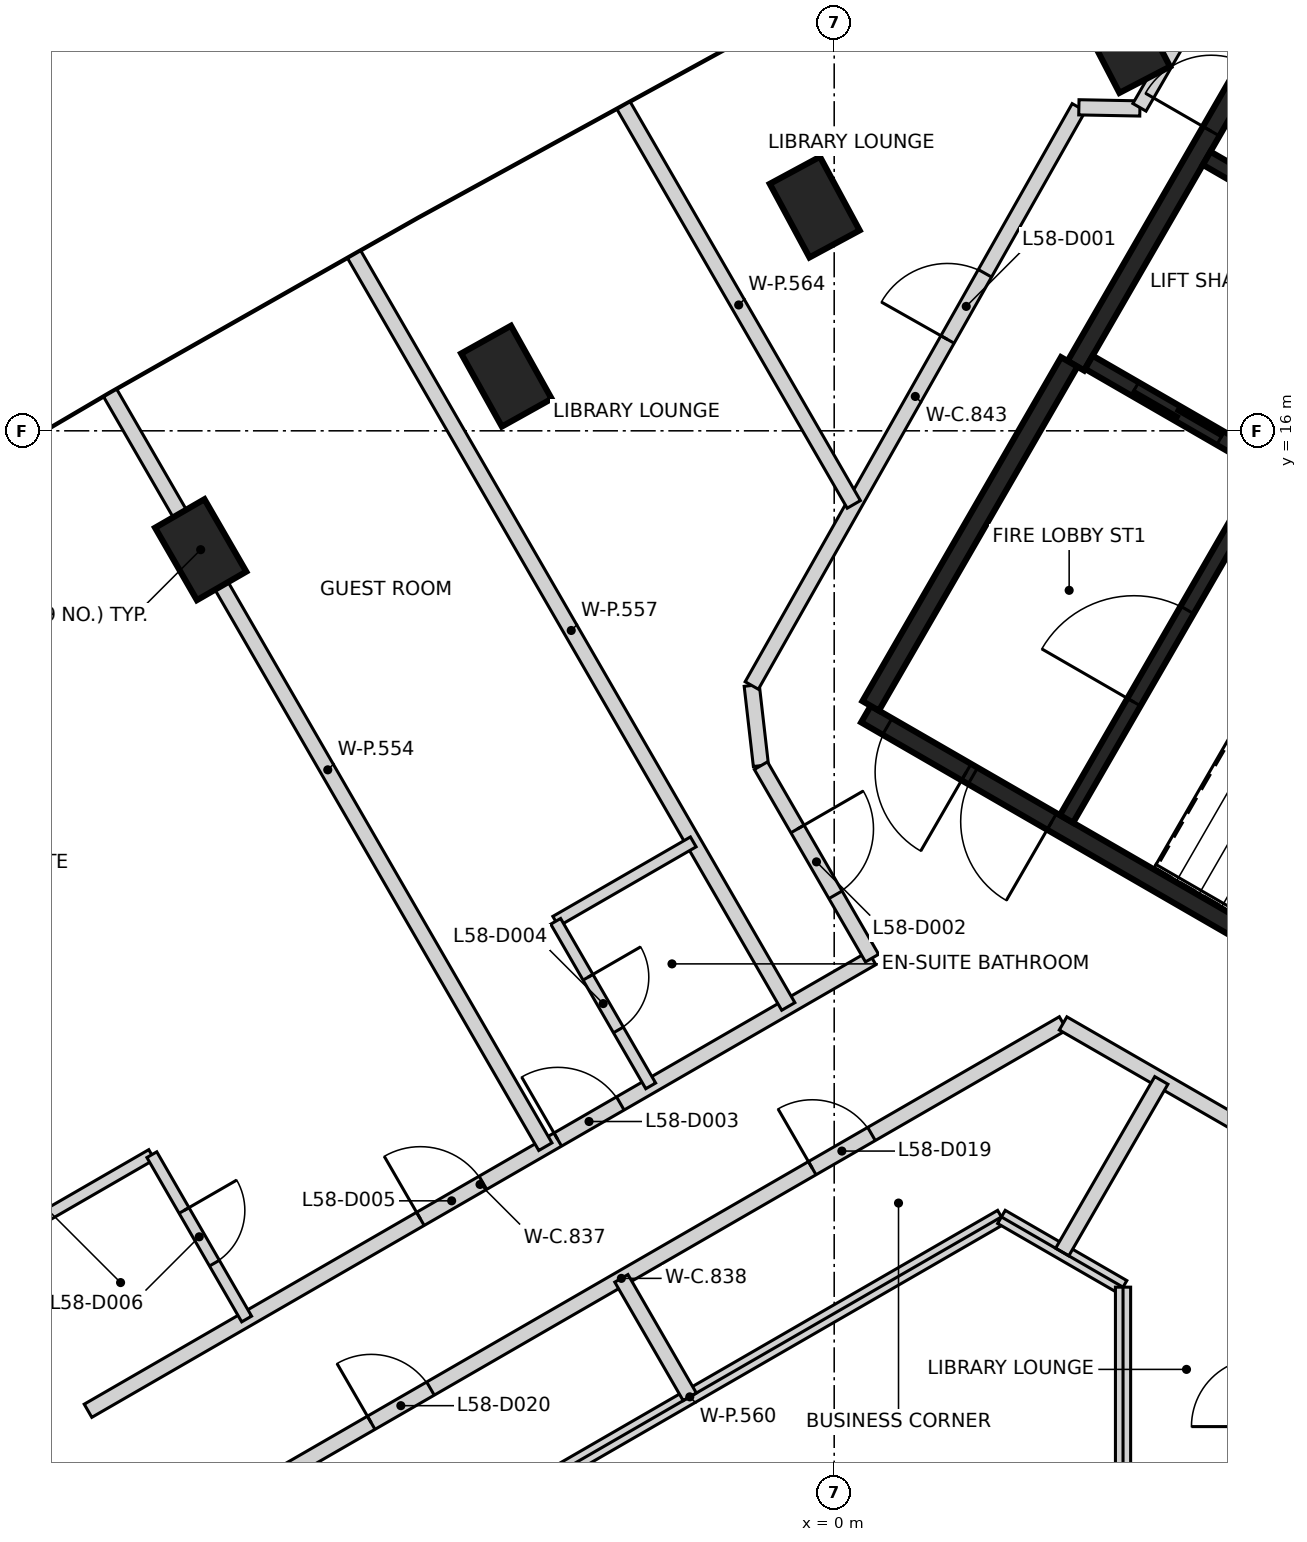
"""IFC4 building model, lengths in metres.
Left out: names, types, materials, properties, quantities, classifications, styles, units other than length and angle.
Written with IfcOpenShell. Run it as: python <this file> out.ifc"""

import sys

from ifc_helpers import new_model, si_unit, direction, frame, frame_2d, origin, origin_2d, place, context, subcontext, project, spatial, rectangle, extrude, element, fill, save


model = new_model("IFC4")
c1 = context("Model", 3, precision=1e-05, world=origin(), true_north=direction((0.0, 1.0)))
c2 = subcontext(c1, "Body", "Model", "MODEL_VIEW")
j1 = project(units=[si_unit("LENGTHUNIT", "METRE"), si_unit("PLANEANGLEUNIT", "RADIAN")], contexts=[c1])
p1 = place(None, origin())
s1 = spatial("IfcSite", under=j1, at=p1, CompositionType="ELEMENT")
p2 = place(p1, origin())
s2 = spatial("IfcBuilding", under=s1, at=p2, CompositionType="ELEMENT")
p3 = place(p2, frame((0.0, 0.0, 232.2)))
s3 = spatial("IfcBuildingStorey", under=s2, at=p3, CompositionType="ELEMENT", Elevation=232.2)
for number, where, z_axis, x_axis in (
    (1, (3.832, 21.107, -0.35), (0.0, 0.0, 1.0), (-0.461, 0.887, 0.0)),
    (2, (-0.256, 18.943, -0.35), (0.0, 0.0, 1.0), (-0.475, 0.88, 0.0)),
    (3, (-4.312, 16.719, -0.35), (0.0, 0.0, 1.0), (-0.487, 0.873, 0.0)),
    (4, (-8.335, 14.436, -0.35), (0.0, 0.0, 1.0), (-0.5, 0.866, 0.0)),
):
    element("IfcColumn", number, at=place(p3, frame(where, z_axis=z_axis, x_axis=x_axis)), inside=s3, PredefinedType="COLUMN", context=c2, shape_type="SweptSolid", body=[
        extrude(rectangle(XDim=1.1, YDim=0.75, at=origin_2d()), origin(), (0.0, 0.0, 1.0), 3.6),
    ])
p4 = place(p3, frame((10.42, 6.498, 0.0), z_axis=(0.0, 0.0, 1.0), x_axis=(-0.866021906294, 0.500006057782, 0.0)))
e5 = element("IfcWall", 5, at=p4, inside=s3, PredefinedType="SHEAR", context=c2, shape_type="SweptSolid", body=[
    extrude(rectangle(XDim=11.55, YDim=0.25, at=frame_2d((5.775, 0.0))), origin(), (0.0, 0.0, 1.0), 3.25),
])
p5 = place(p4, frame((10.025, 0.0, 0.0)))
e6 = element("IfcOpeningElement", 6, at=p5, cuts=e5, PredefinedType="OPENING", context=c2, shape_type="SweptSolid", body=[
    extrude(rectangle(XDim=1.2, YDim=2.1, at=frame_2d((0.6, 1.05))), frame((0.0, 0.135, 0.0), z_axis=(0.0, -1.0, 0.0), x_axis=(1.0, 0.0, 0.0)), (0.0, 0.0, 1.0), 0.27),
])
p6 = place(p4, frame((8.725, 0.0, 0.0)))
e7 = element("IfcOpeningElement", 7, at=p6, cuts=e5, PredefinedType="OPENING", context=c2, shape_type="SweptSolid", body=[
    extrude(rectangle(XDim=1.2, YDim=2.1, at=frame_2d((0.6, 1.05))), frame((0.0, 0.135, 0.0), z_axis=(0.0, -1.0, 0.0), x_axis=(1.0, 0.0, 0.0)), (0.0, 0.0, 1.0), 0.27),
])
p7 = place(p3, frame((3.179, 16.856, 0.0), z_axis=(0.0, 0.0, 1.0), x_axis=(0.500001955336, 0.866024274868, 0.0)))
e8 = element("IfcWall", 8, at=p7, inside=s3, PredefinedType="SHEAR", context=c2, shape_type="SweptSolid", body=[
    extrude(rectangle(XDim=6.125, YDim=0.25, at=frame_2d((3.062, 0.0))), origin(), (0.0, 0.0, 1.0), 3.25),
])
p8 = place(p7, frame((3.563, 0.0, 0.0)))
e9 = element("IfcOpeningElement", 9, at=p8, cuts=e8, PredefinedType="OPENING", context=c2, shape_type="SweptSolid", body=[
    extrude(rectangle(XDim=1.0, YDim=2.1, at=frame_2d((0.5, 1.05))), frame((0.0, 0.135, 0.0), z_axis=(0.0, -1.0, 0.0), x_axis=(1.0, 0.0, 0.0)), (0.0, 0.0, 1.0), 0.27),
])
p9 = place(p3, frame((0.48, 12.381, 0.0), z_axis=(0.0, 0.0, 1.0), x_axis=(0.49999885962, 0.866026062182, 0.0)))
e10 = element("IfcWall", 10, at=p9, inside=s3, PredefinedType="SHEAR", context=c2, shape_type="SweptSolid", body=[
    extrude(rectangle(XDim=5.225, YDim=0.25, at=frame_2d((2.612, 0.0))), origin(), (0.0, 0.0, 1.0), 3.25),
])
p10 = place(p3, frame((3.057, 10.895, 0.0), z_axis=(0.0, 0.0, 1.0), x_axis=(0.500027839223, 0.866009330205, 0.0)))
e11 = element("IfcWall", 11, at=p10, inside=s3, PredefinedType="SHEAR", context=c2, shape_type="SweptSolid", body=[
    extrude(rectangle(XDim=5.098, YDim=0.2, at=frame_2d((2.549, 0.0))), origin(), (0.0, 0.0, 1.0), 3.25),
])
p11 = place(p10, frame((1.774, 0.0, 0.0)))
e12 = element("IfcOpeningElement", 12, at=p11, cuts=e11, PredefinedType="OPENING", context=c2, shape_type="SweptSolid", body=[
    extrude(rectangle(XDim=1.4, YDim=2.1, at=frame_2d((0.7, 1.05))), frame((0.0, 0.11, 0.0), z_axis=(0.0, -1.0, 0.0), x_axis=(1.0, 0.0, 0.0)), (0.0, 0.0, 1.0), 0.22),
])
p12 = place(p3, frame((5.646, 15.576, 0.0), z_axis=(0.0, 0.0, 1.0), x_axis=(-0.866018407898, 0.500012117035, 0.0)))
e13 = element("IfcWall", 13, at=p12, inside=s3, PredefinedType="SHEAR", context=c2, shape_type="SweptSolid", body=[
    extrude(rectangle(XDim=2.651, YDim=0.2, at=frame_2d((1.325, 0.0))), origin(), (0.0, 0.0, 1.0), 3.25),
])
p13 = place(p12, frame((0.652, 0.0, 0.0)))
e14 = element("IfcOpeningElement", 14, at=p13, cuts=e13, PredefinedType="OPENING", context=c2, shape_type="SweptSolid", body=[
    extrude(rectangle(XDim=1.3, YDim=2.1, at=frame_2d((0.65, 1.05))), frame((0.0, 0.11, 0.0), z_axis=(0.0, -1.0, 0.0), x_axis=(1.0, 0.0, 0.0)), (0.0, 0.0, 1.0), 0.22),
])
p14 = place(p3, frame((7.196, 18.26, 0.0), z_axis=(0.0, 0.0, 1.0), x_axis=(-0.866018407898, 0.500012117035, 0.0)))
e15 = element("IfcWall", 15, at=p14, inside=s3, PredefinedType="SHEAR", context=c2, shape_type="SweptSolid", body=[
    extrude(rectangle(XDim=2.651, YDim=0.2, at=frame_2d((1.325, 0.0))), origin(), (0.0, 0.0, 1.0), 3.25),
])
p15 = place(p3, frame((-9.817, 3.108, 0.0), z_axis=(0.0, 0.0, 1.0), x_axis=(0.86603471326, 0.499983875168, 0.0)))
e16 = element("IfcWall", 16, at=p15, inside=s3, PredefinedType="PARTITIONING", context=c2, shape_type="SweptSolid", body=[
    extrude(rectangle(XDim=11.911, YDim=0.2, at=frame_2d((5.955, 0.0))), origin(), (0.0, 0.0, 1.0), 3.25),
])
p16 = place(p15, frame((7.136, 0.0, 0.0)))
e17 = element("IfcOpeningElement", 17, at=p16, cuts=e16, PredefinedType="OPENING", context=c2, shape_type="SweptSolid", body=[
    extrude(rectangle(XDim=0.95, YDim=2.1, at=frame_2d((0.475, 1.05))), frame((0.0, 0.11, 0.0), z_axis=(0.0, -1.0, 0.0), x_axis=(1.0, 0.0, 0.0)), (0.0, 0.0, 1.0), 0.22),
])
p17 = place(p15, frame((5.049, 0.0, 0.0)))
e18 = element("IfcOpeningElement", 18, at=p17, cuts=e16, PredefinedType="OPENING", context=c2, shape_type="SweptSolid", body=[
    extrude(rectangle(XDim=0.95, YDim=2.1, at=frame_2d((0.475, 1.05))), frame((0.0, 0.11, 0.0), z_axis=(0.0, -1.0, 0.0), x_axis=(1.0, 0.0, 0.0)), (0.0, 0.0, 1.0), 0.22),
])
p18 = place(p3, frame((-8.612, 1.494, 0.0), z_axis=(0.0, 0.0, 1.0), x_axis=(0.8660441356, 0.49996755414, 0.0)))
e19 = element("IfcWall", 19, at=p18, inside=s3, PredefinedType="PARTITIONING", context=c2, shape_type="SweptSolid", body=[
    extrude(rectangle(XDim=13.422, YDim=0.2, at=frame_2d((6.711, 0.0))), origin(), (0.0, 0.0, 1.0), 3.25),
])
p19 = place(p18, frame((9.611, 0.0, 0.0)))
e20 = element("IfcOpeningElement", 20, at=p19, cuts=e19, PredefinedType="OPENING", context=c2, shape_type="SweptSolid", body=[
    extrude(rectangle(XDim=0.9, YDim=2.1, at=frame_2d((0.45, 1.05))), frame((0.0, 0.11, 0.0), z_axis=(0.0, -1.0, 0.0), x_axis=(1.0, 0.0, 0.0)), (0.0, 0.0, 1.0), 0.22),
])
p20 = place(p18, frame((2.911, 0.0, 0.0)))
e21 = element("IfcOpeningElement", 21, at=p20, cuts=e19, PredefinedType="OPENING", context=c2, shape_type="SweptSolid", body=[
    extrude(rectangle(XDim=0.9, YDim=2.1, at=frame_2d((0.45, 1.05))), frame((0.0, 0.11, 0.0), z_axis=(0.0, -1.0, 0.0), x_axis=(1.0, 0.0, 0.0)), (0.0, 0.0, 1.0), 0.22),
])
p21 = place(p3, frame((-1.085, 12.65, 0.0), z_axis=(0.0, 0.0, 1.0), x_axis=(0.113812454263, -0.993502252264, 0.0)))
e22 = element("IfcWall", 22, at=p21, inside=s3, PredefinedType="PARTITIONING", context=c2, shape_type="SweptSolid", body=[
    extrude(rectangle(XDim=1.062, YDim=0.2, at=frame_2d((0.531, 0.0))), origin(), (0.0, 0.0, 1.0), 3.25),
])
p22 = place(p3, frame((-1.084, 12.65, 0.0), z_axis=(0.0, 0.0, 1.0), x_axis=(0.492373019537, 0.87038428848, 0.0)))
e23 = element("IfcWall", 23, at=p22, inside=s3, PredefinedType="PARTITIONING", context=c2, shape_type="SweptSolid", body=[
    extrude(rectangle(XDim=8.738, YDim=0.2, at=frame_2d((4.369, 0.0))), origin(), (0.0, 0.0, 1.0), 3.25),
])
p23 = place(p22, frame((5.23, 0.0, 0.0)))
e24 = element("IfcOpeningElement", 24, at=p23, cuts=e23, PredefinedType="OPENING", context=c2, shape_type="SweptSolid", body=[
    extrude(rectangle(XDim=1.0, YDim=2.1, at=frame_2d((0.5, 1.05))), frame((0.0, 0.11, 0.0), z_axis=(0.0, -1.0, 0.0), x_axis=(1.0, 0.0, 0.0)), (0.0, 0.0, 1.0), 0.22),
])
p24 = place(p3, frame((-0.964, 11.595, 0.0), z_axis=(0.0, 0.0, 1.0), x_axis=(0.500081432713, -0.865978383481, 0.0)))
e25 = element("IfcWall", 25, at=p24, inside=s3, PredefinedType="PARTITIONING", context=c2, shape_type="SweptSolid", body=[
    extrude(rectangle(XDim=2.924, YDim=0.2, at=frame_2d((1.462, 0.0))), origin(), (0.0, 0.0, 1.0), 3.25),
])
p25 = place(p24, frame((0.962, 0.0, 0.0)))
e26 = element("IfcOpeningElement", 26, at=p25, cuts=e25, PredefinedType="OPENING", context=c2, shape_type="SweptSolid", body=[
    extrude(rectangle(XDim=1.0, YDim=2.1, at=frame_2d((0.5, 1.05))), frame((0.0, 0.11, 0.0), z_axis=(0.0, -1.0, 0.0), x_axis=(1.0, 0.0, 0.0)), (0.0, 0.0, 1.0), 0.22),
])
p26 = place(p3, frame((3.011, 8.204, 0.0), z_axis=(0.0, 0.0, 1.0), x_axis=(0.86628077395, -0.499557424812, 0.0)))
e27 = element("IfcWall", 27, at=p26, inside=s3, PredefinedType="PARTITIONING", context=c2, shape_type="SweptSolid", body=[
    extrude(rectangle(XDim=2.989, YDim=0.2, at=frame_2d((1.494, 0.0))), origin(), (0.0, 0.0, 1.0), 3.25),
])
p27 = place(p3, frame((3.219, 20.256, 0.0), z_axis=(0.0, 0.0, 1.0), x_axis=(0.99982237262, -0.0188473661, 0.0)))
e28 = element("IfcWall", 28, at=p27, inside=s3, PredefinedType="PARTITIONING", context=c2, shape_type="SweptSolid", body=[
    extrude(rectangle(XDim=0.803, YDim=0.2, at=frame_2d((0.402, 0.0))), origin(), (0.0, 0.0, 1.0), 3.25),
])
p28 = place(p3, frame((4.016, 20.256, 0.0), z_axis=(0.0, 0.0, 1.0), x_axis=(0.500135180047, 0.865947343479, 0.0)))
e29 = element("IfcWall", 29, at=p28, inside=s3, PredefinedType="PARTITIONING", context=c2, shape_type="SweptSolid", body=[
    extrude(rectangle(XDim=1.399, YDim=0.2, at=frame_2d((0.7, 0.0))), origin(), (0.0, 0.0, 1.0), 2.35),
])
p29 = place(p3, frame((-9.525, 16.498, 0.0), z_axis=(0.0, 0.0, 1.0), x_axis=(0.500030684965, -0.866007687087, 0.0)))
e30 = element("IfcWall", 30, at=p29, inside=s3, PredefinedType="PARTITIONING", context=c2, shape_type="SweptSolid", body=[
    extrude(rectangle(XDim=11.45, YDim=0.2, at=frame_2d((5.725, 0.0))), origin(), (0.0, 0.0, 1.0), 3.25),
])
p30 = place(p3, frame((-6.315, 18.32, 0.0), z_axis=(0.0, 0.0, 1.0), x_axis=(0.500012296027, -0.866018304553, 0.0)))
e31 = element("IfcWall", 31, at=p30, inside=s3, PredefinedType="PARTITIONING", context=c2, shape_type="SweptSolid", body=[
    extrude(rectangle(XDim=11.423, YDim=0.2, at=frame_2d((5.711, 0.0))), origin(), (0.0, 0.0, 1.0), 2.35),
])
p31 = place(p3, frame((-6.0, 0.924, 0.0), z_axis=(0.0, 0.0, 1.0), x_axis=(0.866012967051, 0.500021540435, 0.0)))
e32 = element("IfcWall", 32, at=p31, inside=s3, PredefinedType="PARTITIONING", context=c2, shape_type="SweptSolid", body=[
    extrude(rectangle(XDim=9.468, YDim=0.2, at=frame_2d((4.734, 0.0))), origin(), (0.0, 0.0, 1.0), 3.25),
])
p32 = place(p3, frame((-2.8, 4.85, 0.0), z_axis=(0.0, 0.0, 1.0), x_axis=(0.500004188491, -0.866022985545, 0.0)))
e33 = element("IfcWall", 33, at=p32, inside=s3, PredefinedType="PARTITIONING", context=c2, shape_type="SweptSolid", body=[
    extrude(rectangle(XDim=1.8, YDim=0.2, at=frame_2d((0.9, 0.0))), origin(), (0.0, 0.0, 1.0), 3.25),
])
p33 = place(p3, frame((-2.771, 20.279, 0.0), z_axis=(0.0, 0.0, 1.0), x_axis=(0.499939878606, -0.866060112105, 0.0)))
e34 = element("IfcWall", 34, at=p33, inside=s3, PredefinedType="PARTITIONING", context=c2, shape_type="SweptSolid", body=[
    extrude(rectangle(XDim=6.059, YDim=0.2, at=frame_2d((3.029, 0.0))), origin(), (0.0, 0.0, 1.0), 2.35),
])
p34 = place(p3, frame((2.2, 5.658, 0.0), z_axis=(0.0, 0.0, 1.0), x_axis=(0.865818011038, -0.500359042851, 0.0)))
e35 = element("IfcWall", 35, at=p34, inside=s3, PredefinedType="PARTITIONING", context=c2, shape_type="SweptSolid", body=[
    extrude(rectangle(XDim=1.848, YDim=0.2, at=frame_2d((0.924, 0.0))), origin(), (0.0, 0.0, 1.0), 3.25),
])
p35 = place(p3, frame((3.0, 5.196, 0.0), z_axis=(0.0, 0.0, 1.0), x_axis=(0.500076354988, 0.865981315724, 0.0)))
e36 = element("IfcWall", 36, at=p35, inside=s3, PredefinedType="PARTITIONING", context=c2, shape_type="SweptSolid", body=[
    extrude(rectangle(XDim=2.607, YDim=0.2, at=frame_2d((1.304, 0.0))), origin(), (0.0, 0.0, 1.0), 3.25),
])
p36 = place(p3, frame((3.8, -4.734, 0.0), z_axis=(0.0, 0.0, 1.0), x_axis=(0.0, 1.0, 0.0)))
e37 = element("IfcWall", 37, at=p36, inside=s3, PredefinedType="PARTITIONING", context=c2, shape_type="SweptSolid", body=[
    extrude(rectangle(XDim=9.468, YDim=0.2, at=frame_2d((4.734, 0.0))), origin(), (0.0, 0.0, 1.0), 3.25),
])
p37 = place(p3, frame((-10.652, 5.512, 0.0), z_axis=(0.0, 0.0, 1.0), x_axis=(0.866017156151, 0.500014285048, 0.0)))
e38 = element("IfcWall", 38, at=p37, inside=s3, PredefinedType="PARTITIONING", context=c2, shape_type="SweptSolid", body=[
    extrude(rectangle(XDim=1.931, YDim=0.15, at=frame_2d((0.966, 0.0))), origin(), (0.0, 0.0, 1.0), 3.25),
])
p38 = place(p3, frame((-8.977, 6.477, 0.0), z_axis=(0.0, 0.0, 1.0), x_axis=(0.499632127845, -0.86623769072, 0.0)))
e39 = element("IfcWall", 39, at=p38, inside=s3, PredefinedType="PARTITIONING", context=c2, shape_type="SweptSolid", body=[
    extrude(rectangle(XDim=2.496, YDim=0.15, at=frame_2d((1.248, 0.0))), origin(), (0.0, 0.0, 1.0), 3.25),
])
p39 = place(p38, frame((0.847, 0.0, 0.0)))
e40 = element("IfcOpeningElement", 40, at=p39, cuts=e39, PredefinedType="OPENING", context=c2, shape_type="SweptSolid", body=[
    extrude(rectangle(XDim=0.8, YDim=2.1, at=frame_2d((0.4, 1.05))), frame((0.0, 0.085, 0.0), z_axis=(0.0, -1.0, 0.0), x_axis=(1.0, 0.0, 0.0)), (0.0, 0.0, 1.0), 0.17),
])
p40 = place(p3, frame((-3.664, 9.547, 0.0), z_axis=(0.0, 0.0, 1.0), x_axis=(0.866049423672, 0.499958394027, 0.0)))
e41 = element("IfcWall", 41, at=p40, inside=s3, PredefinedType="PARTITIONING", context=c2, shape_type="SweptSolid", body=[
    extrude(rectangle(XDim=2.09, YDim=0.15, at=frame_2d((1.045, 0.0))), origin(), (0.0, 0.0, 1.0), 3.25),
])
p41 = place(p3, frame((-3.664, 9.547, 0.0), z_axis=(0.0, 0.0, 1.0), x_axis=(0.500004234368, -0.866022959057, 0.0)))
e42 = element("IfcWall", 42, at=p41, inside=s3, PredefinedType="PARTITIONING", context=c2, shape_type="SweptSolid", body=[
    extrude(rectangle(XDim=2.5, YDim=0.15, at=frame_2d((1.25, 0.0))), origin(), (0.0, 0.0, 1.0), 3.25),
])
p42 = place(p41, frame((0.85, 0.0, 0.0)))
e43 = element("IfcOpeningElement", 43, at=p42, cuts=e42, PredefinedType="OPENING", context=c2, shape_type="SweptSolid", body=[
    extrude(rectangle(XDim=0.8, YDim=2.1, at=frame_2d((0.4, 1.05))), frame((0.0, 0.085, 0.0), z_axis=(0.0, -1.0, 0.0), x_axis=(1.0, 0.0, 0.0)), (0.0, 0.0, 1.0), 0.17),
])
p43 = place(p13, origin())
e44 = element("IfcDoor", 44, at=p43, inside=s3, OperationType="SLIDING_TO_RIGHT", PredefinedType="DOOR", context=c2, shape_type="SweptSolid", body=[
    extrude(rectangle(XDim=1.3, YDim=2.1, at=frame_2d((0.65, 1.05))), frame((0.0, 0.025, 0.0), z_axis=(0.0, -1.0, 0.0), x_axis=(1.0, 0.0, 0.0)), (0.0, 0.0, 1.0), 0.05),
])
fill(e14, e44)
p44 = place(p8, origin())
e45 = element("IfcDoor", 45, at=p44, inside=s3, OperationType="SINGLE_SWING_LEFT", PredefinedType="DOOR", context=c2, shape_type="SweptSolid", body=[
    extrude(rectangle(XDim=1.0, YDim=2.1, at=frame_2d((0.5, 1.05))), frame((0.0, 0.025, 0.0), z_axis=(0.0, -1.0, 0.0), x_axis=(1.0, 0.0, 0.0)), (0.0, 0.0, 1.0), 0.05),
])
fill(e9, e45)
p45 = place(p5, origin())
e46 = element("IfcDoor", 46, at=p45, inside=s3, OperationType="SINGLE_SWING_LEFT", PredefinedType="DOOR", context=c2, shape_type="SweptSolid", body=[
    extrude(rectangle(XDim=1.2, YDim=2.1, at=frame_2d((0.6, 1.05))), frame((0.0, 0.025, 0.0), z_axis=(0.0, -1.0, 0.0), x_axis=(1.0, 0.0, 0.0)), (0.0, 0.0, 1.0), 0.05),
])
fill(e6, e46)
p46 = place(p6, origin())
e47 = element("IfcDoor", 47, at=p46, inside=s3, OperationType="SINGLE_SWING_RIGHT", PredefinedType="DOOR", context=c2, shape_type="SweptSolid", body=[
    extrude(rectangle(XDim=1.2, YDim=2.1, at=frame_2d((0.6, 1.05))), frame((0.0, 0.025, 0.0), z_axis=(0.0, -1.0, 0.0), x_axis=(1.0, 0.0, 0.0)), (0.0, 0.0, 1.0), 0.05),
])
fill(e7, e47)
p47 = place(p11, origin())
e48 = element("IfcDoor", 48, at=p47, inside=s3, OperationType="SINGLE_SWING_RIGHT", PredefinedType="DOOR", context=c2, shape_type="SweptSolid", body=[
    extrude(rectangle(XDim=1.4, YDim=2.1, at=frame_2d((0.7, 1.05))), frame((0.0, 0.025, 0.0), z_axis=(0.0, -1.0, 0.0), x_axis=(1.0, 0.0, 0.0)), (0.0, 0.0, 1.0), 0.05),
])
fill(e12, e48)
p48 = place(p23, origin())
e49 = element("IfcDoor", 49, at=p48, inside=s3, OperationType="SINGLE_SWING_LEFT", PredefinedType="DOOR", context=c2, shape_type="SweptSolid", body=[
    extrude(rectangle(XDim=1.0, YDim=2.1, at=frame_2d((0.5, 1.05))), frame((0.0, 0.025, 0.0), z_axis=(0.0, -1.0, 0.0), x_axis=(1.0, 0.0, 0.0)), (0.0, 0.0, 1.0), 0.05),
])
fill(e24, e49)
p49 = place(p25, origin())
e50 = element("IfcDoor", 50, at=p49, inside=s3, OperationType="SINGLE_SWING_LEFT", PredefinedType="DOOR", context=c2, shape_type="SweptSolid", body=[
    extrude(rectangle(XDim=1.0, YDim=2.1, at=frame_2d((0.5, 1.05))), frame((0.0, 0.025, 0.0), z_axis=(0.0, -1.0, 0.0), x_axis=(1.0, 0.0, 0.0)), (0.0, 0.0, 1.0), 0.05),
])
fill(e26, e50)
p50 = place(p16, origin())
e51 = element("IfcDoor", 51, at=p50, inside=s3, OperationType="SINGLE_SWING_LEFT", PredefinedType="DOOR", context=c2, shape_type="SweptSolid", body=[
    extrude(rectangle(XDim=0.95, YDim=2.1, at=frame_2d((0.475, 1.05))), frame((0.0, 0.025, 0.0), z_axis=(0.0, -1.0, 0.0), x_axis=(1.0, 0.0, 0.0)), (0.0, 0.0, 1.0), 0.05),
])
fill(e17, e51)
p51 = place(p42, origin())
e52 = element("IfcDoor", 52, at=p51, inside=s3, OperationType="SINGLE_SWING_LEFT", PredefinedType="DOOR", context=c2, shape_type="SweptSolid", body=[
    extrude(rectangle(XDim=0.8, YDim=2.1, at=frame_2d((0.4, 1.05))), frame((0.0, 0.025, 0.0), z_axis=(0.0, -1.0, 0.0), x_axis=(1.0, 0.0, 0.0)), (0.0, 0.0, 1.0), 0.05),
])
fill(e43, e52)
p52 = place(p17, origin())
e53 = element("IfcDoor", 53, at=p52, inside=s3, OperationType="SINGLE_SWING_LEFT", PredefinedType="DOOR", context=c2, shape_type="SweptSolid", body=[
    extrude(rectangle(XDim=0.95, YDim=2.1, at=frame_2d((0.475, 1.05))), frame((0.0, 0.025, 0.0), z_axis=(0.0, -1.0, 0.0), x_axis=(1.0, 0.0, 0.0)), (0.0, 0.0, 1.0), 0.05),
])
fill(e18, e53)
p53 = place(p39, frame((0.8, 0.0, 0.0), z_axis=(0.0, 0.0, 1.0), x_axis=(-1.0, 0.0, 0.0)))
e54 = element("IfcDoor", 54, at=p53, inside=s3, OperationType="SINGLE_SWING_LEFT", PredefinedType="DOOR", context=c2, shape_type="SweptSolid", body=[
    extrude(rectangle(XDim=0.8, YDim=2.1, at=frame_2d((0.4, 1.05))), frame((0.0, 0.025, 0.0), z_axis=(0.0, -1.0, 0.0), x_axis=(1.0, 0.0, 0.0)), (0.0, 0.0, 1.0), 0.05),
])
fill(e40, e54)
p54 = place(p19, frame((0.9, 0.0, 0.0), z_axis=(0.0, 0.0, 1.0), x_axis=(-1.0, 0.0, 0.0)))
e55 = element("IfcDoor", 55, at=p54, inside=s3, OperationType="SINGLE_SWING_LEFT", PredefinedType="DOOR", context=c2, shape_type="SweptSolid", body=[
    extrude(rectangle(XDim=0.9, YDim=2.1, at=frame_2d((0.45, 1.05))), frame((0.0, 0.025, 0.0), z_axis=(0.0, -1.0, 0.0), x_axis=(1.0, 0.0, 0.0)), (0.0, 0.0, 1.0), 0.05),
])
fill(e20, e55)
p55 = place(p20, frame((0.9, 0.0, 0.0), z_axis=(0.0, 0.0, 1.0), x_axis=(-1.0, 0.0, 0.0)))
e56 = element("IfcDoor", 56, at=p55, inside=s3, OperationType="SINGLE_SWING_LEFT", PredefinedType="DOOR", context=c2, shape_type="SweptSolid", body=[
    extrude(rectangle(XDim=0.9, YDim=2.1, at=frame_2d((0.45, 1.05))), frame((0.0, 0.025, 0.0), z_axis=(0.0, -1.0, 0.0), x_axis=(1.0, 0.0, 0.0)), (0.0, 0.0, 1.0), 0.05),
])
fill(e21, e56)
save(model, sys.argv[1])
